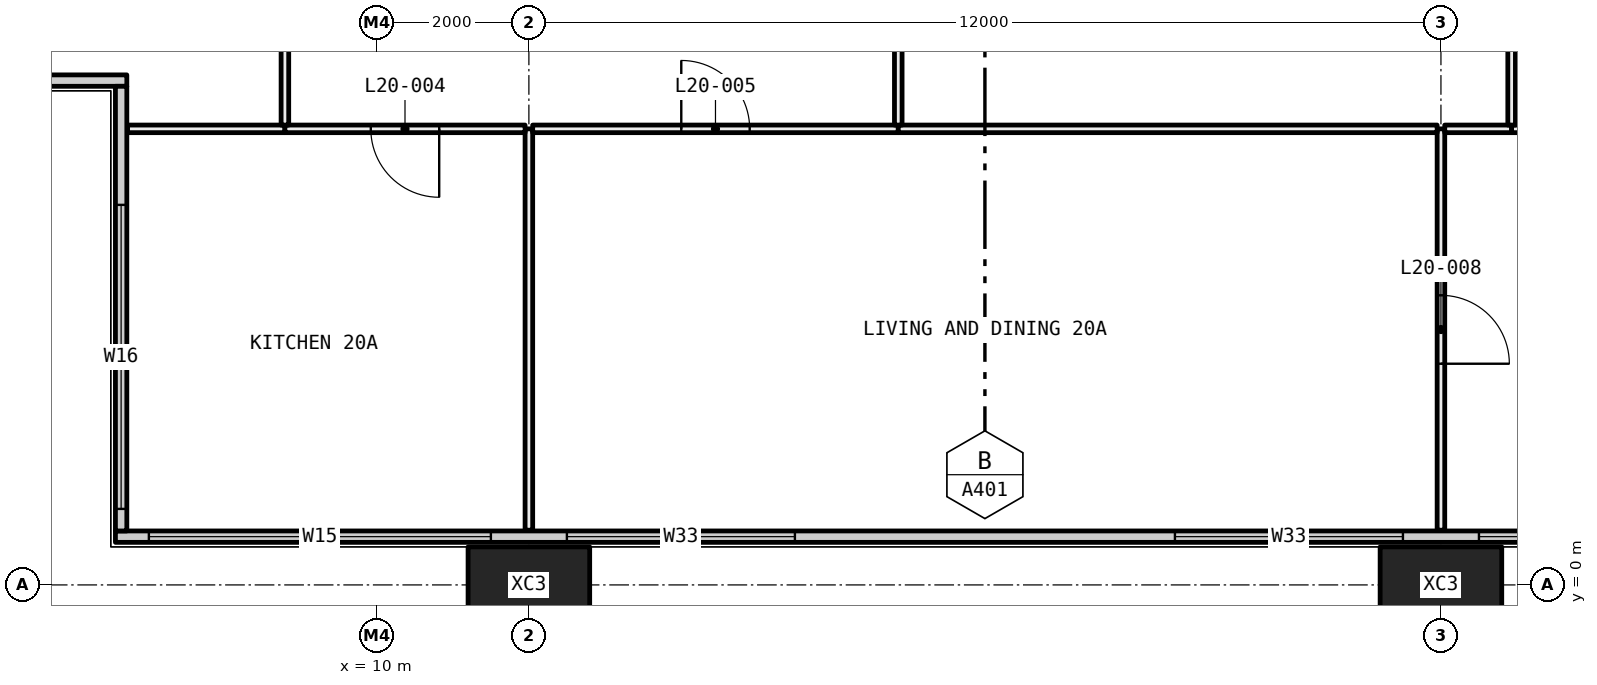
"""IFC4 building model, lengths in metres.
Left out: names, types, materials, properties, quantities, classifications, styles, units other than length and angle.
Written with IfcOpenShell. Run it as: python <this file> out.ifc"""

import sys

from ifc_helpers import new_model, si_unit, direction, frame, frame_2d, origin, origin_2d, place, context, subcontext, project, spatial, rectangle, hollow_rectangle, extrude, element, fill, save


model = new_model("IFC4")
c1 = context("Model", 3, precision=1e-05, world=origin(), true_north=direction((0.0, 1.0)))
c2 = subcontext(c1, "Body", "Model", "MODEL_VIEW")
j1 = project(units=[si_unit("LENGTHUNIT", "METRE"), si_unit("PLANEANGLEUNIT", "RADIAN")], contexts=[c1])
p1 = place(None, origin())
s1 = spatial("IfcSite", under=j1, at=p1, CompositionType="ELEMENT")
p2 = place(p1, origin())
s2 = spatial("IfcBuilding", under=s1, at=p2, CompositionType="ELEMENT")
p3 = place(p2, frame((0.0, 0.0, 81.75)))
s3 = spatial("IfcBuildingStorey", under=s2, at=p3, CompositionType="ELEMENT", Elevation=81.75)
for number, where, z_axis, x_axis in (
    (1, (12.0, 0.0, -0.4), (0.0, 0.0, 1.0), (1.0, 0.0, 0.0)),
    (2, (24.0, 0.0, -0.4), (0.0, 0.0, 1.0), (1.0, 0.0, 0.0)),
):
    element("IfcColumn", number, at=place(p3, frame(where, z_axis=z_axis, x_axis=x_axis)), inside=s3, PredefinedType="COLUMN", context=c2, shape_type="SweptSolid", body=[
        extrude(hollow_rectangle(XDim=1.6, YDim=1.0, WallThickness=0.065, at=origin_2d()), origin(), (0.0, 0.0, 1.0), 3.45),
    ])
p4 = place(p3, frame((6.56, 0.635, 0.0), z_axis=(0.0, 0.0, 1.0), x_axis=(1.0, 0.0, 0.0)))
e3 = element("IfcWall", 3, at=p4, inside=s3, PredefinedType="ELEMENTEDWALL", context=c2, shape_type="SweptSolid", body=[
    extrude(rectangle(XDim=58.88, YDim=0.15, at=frame_2d((29.44, 0.0))), origin(), (0.0, 0.0, 1.0), 3.05),
])
p5 = place(p4, frame((0.44, 0.0, 0.45)))
e4 = element("IfcOpeningElement", 4, at=p5, cuts=e3, PredefinedType="OPENING", context=c2, shape_type="SweptSolid", body=[
    extrude(rectangle(XDim=4.5, YDim=2.55, at=frame_2d((2.25, 1.275))), frame((0.0, 0.085, 0.0), z_axis=(0.0, -1.0, 0.0), x_axis=(1.0, 0.0, 0.0)), (0.0, 0.0, 1.0), 0.17),
])
p6 = place(p4, frame((5.94, 0.0, 0.45)))
e5 = element("IfcOpeningElement", 5, at=p6, cuts=e3, PredefinedType="OPENING", context=c2, shape_type="SweptSolid", body=[
    extrude(rectangle(XDim=3.0, YDim=2.55, at=frame_2d((1.5, 1.275))), frame((0.0, 0.085, 0.0), z_axis=(0.0, -1.0, 0.0), x_axis=(1.0, 0.0, 0.0)), (0.0, 0.0, 1.0), 0.17),
])
p7 = place(p4, frame((13.94, 0.0, 0.45)))
e6 = element("IfcOpeningElement", 6, at=p7, cuts=e3, PredefinedType="OPENING", context=c2, shape_type="SweptSolid", body=[
    extrude(rectangle(XDim=3.0, YDim=2.55, at=frame_2d((1.5, 1.275))), frame((0.0, 0.085, 0.0), z_axis=(0.0, -1.0, 0.0), x_axis=(1.0, 0.0, 0.0)), (0.0, 0.0, 1.0), 0.17),
])
p8 = place(p4, frame((17.94, 0.0, 0.45)))
e7 = element("IfcOpeningElement", 7, at=p8, cuts=e3, PredefinedType="OPENING", context=c2, shape_type="SweptSolid", body=[
    extrude(rectangle(XDim=3.0, YDim=2.55, at=frame_2d((1.5, 1.275))), frame((0.0, 0.085, 0.0), z_axis=(0.0, -1.0, 0.0), x_axis=(1.0, 0.0, 0.0)), (0.0, 0.0, 1.0), 0.17),
])
p9 = place(p4, frame((26.94, 0.0, 0.45)))
e8 = element("IfcOpeningElement", 8, at=p9, cuts=e3, PredefinedType="OPENING", context=c2, shape_type="SweptSolid", body=[
    extrude(rectangle(XDim=2.0, YDim=2.55, at=frame_2d((1.0, 1.275))), frame((0.0, 0.085, 0.0), z_axis=(0.0, -1.0, 0.0), x_axis=(1.0, 0.0, 0.0)), (0.0, 0.0, 1.0), 0.17),
])
p10 = place(p4, frame((29.94, 0.0, 0.45)))
e9 = element("IfcOpeningElement", 9, at=p10, cuts=e3, PredefinedType="OPENING", context=c2, shape_type="SweptSolid", body=[
    extrude(rectangle(XDim=3.0, YDim=2.55, at=frame_2d((1.5, 1.275))), frame((0.0, 0.085, 0.0), z_axis=(0.0, -1.0, 0.0), x_axis=(1.0, 0.0, 0.0)), (0.0, 0.0, 1.0), 0.17),
])
p11 = place(p4, frame((37.94, 0.0, 0.45)))
e10 = element("IfcOpeningElement", 10, at=p11, cuts=e3, PredefinedType="OPENING", context=c2, shape_type="SweptSolid", body=[
    extrude(rectangle(XDim=3.0, YDim=2.55, at=frame_2d((1.5, 1.275))), frame((0.0, 0.085, 0.0), z_axis=(0.0, -1.0, 0.0), x_axis=(1.0, 0.0, 0.0)), (0.0, 0.0, 1.0), 0.17),
])
p12 = place(p4, frame((41.94, 0.0, 0.45)))
e11 = element("IfcOpeningElement", 11, at=p12, cuts=e3, PredefinedType="OPENING", context=c2, shape_type="SweptSolid", body=[
    extrude(rectangle(XDim=3.0, YDim=2.55, at=frame_2d((1.5, 1.275))), frame((0.0, 0.085, 0.0), z_axis=(0.0, -1.0, 0.0), x_axis=(1.0, 0.0, 0.0)), (0.0, 0.0, 1.0), 0.17),
])
p13 = place(p4, frame((50.94, 0.0, 0.45)))
e12 = element("IfcOpeningElement", 12, at=p13, cuts=e3, PredefinedType="OPENING", context=c2, shape_type="SweptSolid", body=[
    extrude(rectangle(XDim=2.0, YDim=2.55, at=frame_2d((1.0, 1.275))), frame((0.0, 0.085, 0.0), z_axis=(0.0, -1.0, 0.0), x_axis=(1.0, 0.0, 0.0)), (0.0, 0.0, 1.0), 0.17),
])
p14 = place(p4, frame((53.94, 0.0, 0.45)))
e13 = element("IfcOpeningElement", 13, at=p14, cuts=e3, PredefinedType="OPENING", context=c2, shape_type="SweptSolid", body=[
    extrude(rectangle(XDim=4.5, YDim=2.55, at=frame_2d((2.25, 1.275))), frame((0.0, 0.085, 0.0), z_axis=(0.0, -1.0, 0.0), x_axis=(1.0, 0.0, 0.0)), (0.0, 0.0, 1.0), 0.17),
])
p15 = place(p3, frame((0.56, 6.635, 0.0), z_axis=(0.0, 0.0, 1.0), x_axis=(1.0, 0.0, 0.0)))
e14 = element("IfcWall", 14, at=p15, inside=s3, PredefinedType="ELEMENTEDWALL", context=c2, shape_type="SweptSolid", body=[
    extrude(rectangle(XDim=6.15, YDim=0.15, at=frame_2d((3.075, 0.0))), origin(), (0.0, 0.0, 1.0), 3.05),
])
p16 = place(p15, frame((0.44, 0.0, 0.45)))
e15 = element("IfcOpeningElement", 15, at=p16, cuts=e14, PredefinedType="OPENING", context=c2, shape_type="SweptSolid", body=[
    extrude(rectangle(XDim=4.0, YDim=2.55, at=frame_2d((2.0, 1.275))), frame((0.0, 0.085, 0.0), z_axis=(0.0, -1.0, 0.0), x_axis=(1.0, 0.0, 0.0)), (0.0, 0.0, 1.0), 0.17),
])
p17 = place(p3, frame((6.635, 0.71, 0.0), z_axis=(0.0, 0.0, 1.0), x_axis=(0.0, 1.0, 0.0)))
e16 = element("IfcWall", 16, at=p17, inside=s3, PredefinedType="ELEMENTEDWALL", context=c2, shape_type="SweptSolid", body=[
    extrude(rectangle(XDim=5.85, YDim=0.15, at=frame_2d((2.925, 0.0))), origin(), (0.0, 0.0, 1.0), 3.05),
])
p18 = place(p17, frame((0.29, 0.0, 0.45)))
e17 = element("IfcOpeningElement", 17, at=p18, cuts=e16, PredefinedType="OPENING", context=c2, shape_type="SweptSolid", body=[
    extrude(rectangle(XDim=4.0, YDim=2.55, at=frame_2d((2.0, 1.275))), frame((0.0, 0.085, 0.0), z_axis=(0.0, -1.0, 0.0), x_axis=(1.0, 0.0, 0.0)), (0.0, 0.0, 1.0), 0.17),
])
p19 = place(p3, frame((12.0, 0.72, 0.0), z_axis=(0.0, 0.0, 1.0), x_axis=(0.0, 1.0, 0.0)))
e18 = element("IfcWall", 18, at=p19, inside=s3, PredefinedType="PARTITIONING", context=c2, shape_type="SweptSolid", body=[
    extrude(rectangle(XDim=5.28, YDim=0.1, at=frame_2d((2.64, 0.0))), origin(), (0.0, 0.0, 1.0), 2.45),
])
p20 = place(p3, frame((8.79, 6.0, 0.0), z_axis=(0.0, 0.0, 1.0), x_axis=(-1.0, 0.0, 0.0)))
e19 = element("IfcWall", 19, at=p20, inside=s3, PredefinedType="PARTITIONING", context=c2, shape_type="SweptSolid", body=[
    extrude(rectangle(XDim=2.07, YDim=0.1, at=frame_2d((1.035, 0.0))), origin(), (0.0, 0.0, 1.0), 3.05),
])
p21 = place(p3, frame((11.95, 6.0, 0.0), z_axis=(0.0, 0.0, 1.0), x_axis=(-1.0, 0.0, 0.0)))
e20 = element("IfcWall", 20, at=p21, inside=s3, PredefinedType="PARTITIONING", context=c2, shape_type="SweptSolid", body=[
    extrude(rectangle(XDim=3.16, YDim=0.1, at=frame_2d((1.58, 0.0))), origin(), (0.0, 0.0, 1.0), 2.45),
])
p22 = place(p21, frame((1.13, 0.0, 0.0)))
e21 = element("IfcOpeningElement", 21, at=p22, cuts=e20, PredefinedType="OPENING", context=c2, shape_type="SweptSolid", body=[
    extrude(rectangle(XDim=0.9, YDim=2.1, at=frame_2d((0.45, 1.05))), frame((0.0, 0.06, 0.0), z_axis=(0.0, -1.0, 0.0), x_axis=(1.0, 0.0, 0.0)), (0.0, 0.0, 1.0), 0.12),
])
p23 = place(p3, frame((24.0, 0.72, 0.0), z_axis=(0.0, 0.0, 1.0), x_axis=(0.0, 1.0, 0.0)))
e22 = element("IfcWall", 22, at=p23, inside=s3, PredefinedType="PARTITIONING", context=c2, shape_type="SweptSolid", body=[
    extrude(rectangle(XDim=5.28, YDim=0.1, at=frame_2d((2.64, 0.0))), origin(), (0.0, 0.0, 1.0), 2.45),
])
p24 = place(p23, frame((2.19, 0.0, 0.0)))
e23 = element("IfcOpeningElement", 23, at=p24, cuts=e22, PredefinedType="OPENING", context=c2, shape_type="SweptSolid", body=[
    extrude(rectangle(XDim=0.9, YDim=2.1, at=frame_2d((0.45, 1.05))), frame((0.0, 0.06, 0.0), z_axis=(0.0, -1.0, 0.0), x_axis=(1.0, 0.0, 0.0)), (0.0, 0.0, 1.0), 0.12),
])
p25 = place(p3, frame((16.86, 6.0, 0.0), z_axis=(0.0, 0.0, 1.0), x_axis=(-1.0, 0.0, 0.0)))
e24 = element("IfcWall", 24, at=p25, inside=s3, PredefinedType="PARTITIONING", context=c2, shape_type="SweptSolid", body=[
    extrude(rectangle(XDim=4.81, YDim=0.1, at=frame_2d((2.405, 0.0))), origin(), (0.0, 0.0, 1.0), 2.45),
])
p26 = place(p25, frame((1.955, 0.0, 0.0)))
e25 = element("IfcOpeningElement", 25, at=p26, cuts=e24, PredefinedType="OPENING", context=c2, shape_type="SweptSolid", body=[
    extrude(rectangle(XDim=0.9, YDim=2.1, at=frame_2d((0.45, 1.05))), frame((0.0, 0.06, 0.0), z_axis=(0.0, -1.0, 0.0), x_axis=(1.0, 0.0, 0.0)), (0.0, 0.0, 1.0), 0.12),
])
p27 = place(p3, frame((23.95, 6.0, 0.0), z_axis=(0.0, 0.0, 1.0), x_axis=(-1.0, 0.0, 0.0)))
e26 = element("IfcWall", 26, at=p27, inside=s3, PredefinedType="PARTITIONING", context=c2, shape_type="SweptSolid", body=[
    extrude(rectangle(XDim=7.09, YDim=0.1, at=frame_2d((3.545, 0.0))), origin(), (0.0, 0.0, 1.0), 2.45),
])
p28 = place(p3, frame((24.93, 6.0, 0.0), z_axis=(0.0, 0.0, 1.0), x_axis=(-1.0, 0.0, 0.0)))
e27 = element("IfcWall", 27, at=p28, inside=s3, PredefinedType="PARTITIONING", context=c2, shape_type="SweptSolid", body=[
    extrude(rectangle(XDim=0.88, YDim=0.1, at=frame_2d((0.44, 0.0))), origin(), (0.0, 0.0, 1.0), 2.45),
])
p29 = place(p3, frame((29.95, 6.0, 0.0), z_axis=(0.0, 0.0, 1.0), x_axis=(-1.0, 0.0, 0.0)))
e28 = element("IfcWall", 28, at=p29, inside=s3, PredefinedType="PARTITIONING", context=c2, shape_type="SweptSolid", body=[
    extrude(rectangle(XDim=5.02, YDim=0.1, at=frame_2d((2.51, 0.0))), origin(), (0.0, 0.0, 1.0), 3.05),
])
p30 = place(p3, frame((8.79, 6.05, 0.0), z_axis=(0.0, 0.0, 1.0), x_axis=(0.0, 1.0, 0.0)))
e29 = element("IfcWall", 29, at=p30, inside=s3, PredefinedType="PARTITIONING", context=c2, shape_type="SweptSolid", body=[
    extrude(rectangle(XDim=5.95, YDim=0.1, at=frame_2d((2.975, 0.0))), origin(), (0.0, 0.0, 1.0), 2.45),
])
p31 = place(p30, frame((2.525, 0.0, 0.0)))
e30 = element("IfcOpeningElement", 30, at=p31, cuts=e29, PredefinedType="OPENING", context=c2, shape_type="SweptSolid", body=[
    extrude(rectangle(XDim=0.9, YDim=2.1, at=frame_2d((0.45, 1.05))), frame((0.0, 0.06, 0.0), z_axis=(0.0, -1.0, 0.0), x_axis=(1.0, 0.0, 0.0)), (0.0, 0.0, 1.0), 0.12),
])
p32 = place(p3, frame((16.86, 6.05, 0.0), z_axis=(0.0, 0.0, 1.0), x_axis=(0.0, 1.0, 0.0)))
e31 = element("IfcWall", 31, at=p32, inside=s3, PredefinedType="PARTITIONING", context=c2, shape_type="SweptSolid", body=[
    extrude(rectangle(XDim=5.95, YDim=0.1, at=frame_2d((2.975, 0.0))), origin(), (0.0, 0.0, 1.0), 2.45),
])
p33 = place(p3, frame((24.93, 6.05, 0.0), z_axis=(0.0, 0.0, 1.0), x_axis=(0.0, 1.0, 0.0)))
e32 = element("IfcWall", 32, at=p33, inside=s3, PredefinedType="PARTITIONING", context=c2, shape_type="SweptSolid", body=[
    extrude(rectangle(XDim=5.95, YDim=0.1, at=frame_2d((2.975, 0.0))), origin(), (0.0, 0.0, 1.0), 2.45),
])
p34 = place(p33, frame((2.525, 0.0, 0.0)))
e33 = element("IfcOpeningElement", 33, at=p34, cuts=e32, PredefinedType="OPENING", context=c2, shape_type="SweptSolid", body=[
    extrude(rectangle(XDim=0.9, YDim=2.1, at=frame_2d((0.45, 1.05))), frame((0.0, 0.06, 0.0), z_axis=(0.0, -1.0, 0.0), x_axis=(1.0, 0.0, 0.0)), (0.0, 0.0, 1.0), 0.12),
])
p35 = place(p5, origin())
e34 = element("IfcWindow", 34, at=p35, inside=s3, PartitioningType="SINGLE_PANEL", PredefinedType="WINDOW", context=c2, shape_type="SweptSolid", body=[
    extrude(rectangle(XDim=4.5, YDim=2.55, at=frame_2d((2.25, 1.275))), frame((0.0, 0.03, 0.0), z_axis=(0.0, -1.0, 0.0), x_axis=(1.0, 0.0, 0.0)), (0.0, 0.0, 1.0), 0.06),
])
fill(e4, e34)
p36 = place(p6, origin())
e35 = element("IfcWindow", 35, at=p36, inside=s3, PartitioningType="SINGLE_PANEL", PredefinedType="WINDOW", context=c2, shape_type="SweptSolid", body=[
    extrude(rectangle(XDim=3.0, YDim=2.55, at=frame_2d((1.5, 1.275))), frame((0.0, 0.03, 0.0), z_axis=(0.0, -1.0, 0.0), x_axis=(1.0, 0.0, 0.0)), (0.0, 0.0, 1.0), 0.06),
])
fill(e5, e35)
p37 = place(p7, origin())
e36 = element("IfcWindow", 36, at=p37, inside=s3, PartitioningType="SINGLE_PANEL", PredefinedType="WINDOW", context=c2, shape_type="SweptSolid", body=[
    extrude(rectangle(XDim=3.0, YDim=2.55, at=frame_2d((1.5, 1.275))), frame((0.0, 0.03, 0.0), z_axis=(0.0, -1.0, 0.0), x_axis=(1.0, 0.0, 0.0)), (0.0, 0.0, 1.0), 0.06),
])
fill(e6, e36)
p38 = place(p8, origin())
e37 = element("IfcWindow", 37, at=p38, inside=s3, PartitioningType="SINGLE_PANEL", PredefinedType="WINDOW", context=c2, shape_type="SweptSolid", body=[
    extrude(rectangle(XDim=3.0, YDim=2.55, at=frame_2d((1.5, 1.275))), frame((0.0, 0.03, 0.0), z_axis=(0.0, -1.0, 0.0), x_axis=(1.0, 0.0, 0.0)), (0.0, 0.0, 1.0), 0.06),
])
fill(e7, e37)
p39 = place(p18, origin())
e38 = element("IfcWindow", 38, at=p39, inside=s3, PartitioningType="SINGLE_PANEL", PredefinedType="WINDOW", context=c2, shape_type="SweptSolid", body=[
    extrude(rectangle(XDim=4.0, YDim=2.55, at=frame_2d((2.0, 1.275))), frame((0.0, 0.03, 0.0), z_axis=(0.0, -1.0, 0.0), x_axis=(1.0, 0.0, 0.0)), (0.0, 0.0, 1.0), 0.06),
])
fill(e17, e38)
p40 = place(p22, origin())
e39 = element("IfcDoor", 39, at=p40, inside=s3, OperationType="SINGLE_SWING_RIGHT", PredefinedType="DOOR", context=c2, shape_type="SweptSolid", body=[
    extrude(rectangle(XDim=0.9, YDim=2.1, at=frame_2d((0.45, 1.05))), frame((0.0, 0.025, 0.0), z_axis=(0.0, -1.0, 0.0), x_axis=(1.0, 0.0, 0.0)), (0.0, 0.0, 1.0), 0.05),
])
fill(e21, e39)
p41 = place(p26, frame((0.9, 0.0, 0.0), x_axis=(-1.0, 0.0, 0.0)))
e40 = element("IfcDoor", 40, at=p41, inside=s3, OperationType="SINGLE_SWING_RIGHT", PredefinedType="DOOR", context=c2, shape_type="SweptSolid", body=[
    extrude(rectangle(XDim=0.9, YDim=2.1, at=frame_2d((0.45, 1.05))), frame((0.0, 0.025, 0.0), z_axis=(0.0, -1.0, 0.0), x_axis=(1.0, 0.0, 0.0)), (0.0, 0.0, 1.0), 0.05),
])
fill(e25, e40)
p42 = place(p24, frame((0.9, 0.0, 0.0), x_axis=(-1.0, 0.0, 0.0)))
e41 = element("IfcDoor", 41, at=p42, inside=s3, OperationType="SINGLE_SWING_LEFT", PredefinedType="DOOR", context=c2, shape_type="SweptSolid", body=[
    extrude(rectangle(XDim=0.9, YDim=2.1, at=frame_2d((0.45, 1.05))), frame((0.0, 0.025, 0.0), z_axis=(0.0, -1.0, 0.0), x_axis=(1.0, 0.0, 0.0)), (0.0, 0.0, 1.0), 0.05),
])
fill(e23, e41)
save(model, sys.argv[1])
